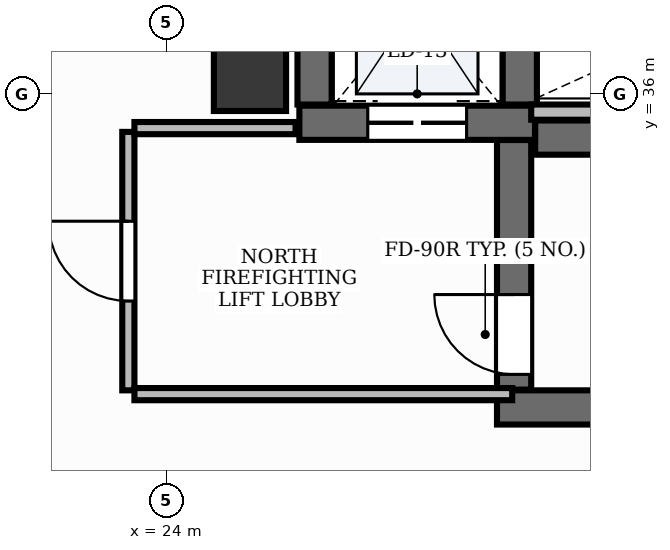
"""IFC4 building model, lengths in metres.
Left out: names, types, materials, properties, quantities, classifications, styles, units other than length and angle.
Written with IfcOpenShell. Run it as: python <this file> out.ifc"""

import sys

from ifc_helpers import new_model, si_unit, direction, frame, frame_2d, origin, origin_2d, place, context, subcontext, project, spatial, rectangle, extrude, element, fill, save


model = new_model("IFC4")
c1 = context("Model", 3, precision=1e-05, world=origin(), true_north=direction((0.0, 1.0)))
c2 = subcontext(c1, "Body", "Model", "MODEL_VIEW")
j1 = project(units=[si_unit("LENGTHUNIT", "METRE"), si_unit("PLANEANGLEUNIT", "RADIAN")], contexts=[c1])
p1 = place(None, origin())
s1 = spatial("IfcSite", under=j1, at=p1, CompositionType="ELEMENT")
p2 = place(p1, origin())
s2 = spatial("IfcBuilding", under=s1, at=p2, CompositionType="ELEMENT")
p3 = place(p2, frame((0.0, 0.0, 67.8)))
s3 = spatial("IfcBuildingStorey", under=s2, at=p3, CompositionType="ELEMENT", Elevation=67.8)
p4 = place(p3, frame((28.852, 35.425, 0.0), z_axis=(0.0, 0.0, 1.0), x_axis=(1.0, 0.0, 0.0)))
e1 = element("IfcWall", 1, at=p4, inside=s3, PredefinedType="SHEAR", context=c2, shape_type="SweptSolid", body=[
    extrude(rectangle(XDim=8.248, YDim=0.45, at=frame_2d((4.124, 0.0))), origin(), (0.0, 0.0, 1.0), 3.9),
])
p5 = place(p3, frame((28.35, 31.875, 0.0), z_axis=(0.0, 0.0, 1.0), x_axis=(1.0, 0.0, 0.0)))
e2 = element("IfcWall", 2, at=p5, inside=s3, PredefinedType="SHEAR", context=c2, shape_type="SweptSolid", body=[
    extrude(rectangle(XDim=8.75, YDim=0.45, at=frame_2d((4.375, 0.0))), origin(), (0.0, 0.0, 1.0), 3.9),
])
p6 = place(p3, frame((28.575, 32.11, 0.0), z_axis=(0.0, 0.0, 1.0), x_axis=(0.0, 1.0, 0.0)))
e3 = element("IfcWall", 3, at=p6, inside=s3, PredefinedType="SHEAR", context=c2, shape_type="SweptSolid", body=[
    extrude(rectangle(XDim=3.283, YDim=0.45, at=frame_2d((1.642, 0.0))), origin(), (0.0, 0.0, 1.0), 3.9),
])
p7 = place(p6, frame((0.2, 0.0, 0.0)))
e4 = element("IfcOpeningElement", 4, at=p7, cuts=e3, PredefinedType="OPENING", context=c2, shape_type="SweptSolid", body=[
    extrude(rectangle(XDim=1.05, YDim=2.15, at=frame_2d((0.525, 1.075))), frame((0.0, 0.24, 0.0), z_axis=(0.0, -1.0, 0.0), x_axis=(1.0, 0.0, 0.0)), (0.0, 0.0, 1.0), 0.48),
])
p8 = place(p3, frame((25.75, 35.62, 0.0), z_axis=(0.0, 0.0, 1.0), x_axis=(1.0, 0.0, 0.0)))
e5 = element("IfcWall", 5, at=p8, inside=s3, PredefinedType="SHEAR", context=c2, shape_type="SweptSolid", body=[
    extrude(rectangle(XDim=3.1, YDim=0.45, at=frame_2d((1.55, 0.0))), origin(), (0.0, 0.0, 1.0), 3.9),
])
p9 = place(p8, frame((0.9, 0.0, 0.0)))
e6 = element("IfcOpeningElement", 6, at=p9, cuts=e5, PredefinedType="OPENING", context=c2, shape_type="SweptSolid", body=[
    extrude(rectangle(XDim=1.3, YDim=2.2, at=frame_2d((0.65, 1.1))), frame((0.0, 0.24, 0.0), z_axis=(0.0, -1.0, 0.0), x_axis=(1.0, 0.0, 0.0)), (0.0, 0.0, 1.0), 0.48),
])
for number, where, z_axis, x_axis in (
    (7, (25.95, 35.86, 0.0), (0.0, 0.0, 1.0), (0.0, 1.0, 0.0)),
    (8, (28.65, 35.86, 0.0), (0.0, 0.0, 1.0), (0.0, 1.0, 0.0)),
):
    element("IfcWall", number, at=place(p3, frame(where, z_axis=z_axis, x_axis=x_axis)), inside=s3, PredefinedType="SHEAR", context=c2, shape_type="SweptSolid", body=[
        extrude(rectangle(XDim=2.7, YDim=0.45, at=frame_2d((1.35, 0.0))), origin(), (0.0, 0.0, 1.0), 3.9),
    ])
p10 = place(p3, frame((25.1, 36.25, -0.0), z_axis=(0.0, 0.0, 1.0), x_axis=(1.0, 0.0, 0.0)))
e9 = element("IfcColumn", 9, at=p10, inside=s3, PredefinedType="PILASTER", context=c2, shape_type="SweptSolid", body=[
    extrude(rectangle(XDim=0.95, YDim=0.95, at=origin_2d()), origin(), (0.0, 0.0, 1.0), 3.901),
])
p11 = place(p3, frame((28.8, 35.76, 0.0), z_axis=(0.0, 0.0, 1.0), x_axis=(1.0, 0.0, 0.0)))
e10 = element("IfcWall", 10, at=p11, inside=s3, PredefinedType="PARTITIONING", context=c2, shape_type="SweptSolid", body=[
    extrude(rectangle(XDim=4.57, YDim=0.2, at=frame_2d((2.285, 0.0))), origin(), (0.0, 0.0, 1.0), 2.91),
])
p12 = place(p3, frame((23.5, 32.1, 0.0), z_axis=(0.0, 0.0, 1.0), x_axis=(0.0, 1.0, 0.0)))
e11 = element("IfcWall", 11, at=p12, inside=s3, PredefinedType="PARTITIONING", context=c2, shape_type="SweptSolid", body=[
    extrude(rectangle(XDim=3.4, YDim=0.16, at=frame_2d((1.7, 0.0))), origin(), (0.0, 0.0, 1.0), 2.91),
])
p13 = place(p12, frame((1.175, 0.0, 0.0)))
e12 = element("IfcOpeningElement", 12, at=p13, cuts=e11, PredefinedType="OPENING", context=c2, shape_type="SweptSolid", body=[
    extrude(rectangle(XDim=1.05, YDim=2.15, at=frame_2d((0.525, 1.075))), frame((0.0, 0.095, 0.0), z_axis=(0.0, -1.0, 0.0), x_axis=(1.0, 0.0, 0.0)), (0.0, 0.0, 1.0), 0.19),
])
p14 = place(p3, frame((23.58, 32.05, 0.0), z_axis=(0.0, 0.0, 1.0), x_axis=(1.0, 0.0, 0.0)))
e13 = element("IfcWall", 13, at=p14, inside=s3, PredefinedType="PARTITIONING", context=c2, shape_type="SweptSolid", body=[
    extrude(rectangle(XDim=4.97, YDim=0.16, at=frame_2d((2.485, 0.0))), origin(), (0.0, 0.0, 1.0), 2.91),
])
p15 = place(p3, frame((23.58, 35.55, 0.0), z_axis=(0.0, 0.0, 1.0), x_axis=(1.0, 0.0, 0.0)))
e14 = element("IfcWall", 14, at=p15, inside=s3, PredefinedType="PARTITIONING", context=c2, shape_type="SweptSolid", body=[
    extrude(rectangle(XDim=2.12, YDim=0.16, at=frame_2d((1.06, 0.0))), origin(), (0.0, 0.0, 1.0), 2.91),
])
p16 = place(p7, origin())
e15 = element("IfcDoor", 15, at=p16, inside=s3, OperationType="SINGLE_SWING_RIGHT", PredefinedType="DOOR", context=c2, shape_type="SweptSolid", body=[
    extrude(rectangle(XDim=1.05, YDim=2.15, at=frame_2d((0.525, 1.075))), frame((0.0, 0.025, 0.0), z_axis=(0.0, -1.0, 0.0), x_axis=(1.0, 0.0, 0.0)), (0.0, 0.0, 1.0), 0.05),
])
fill(e4, e15)
p17 = place(p9, origin())
e16 = element("IfcDoor", 16, at=p17, inside=s3, OperationType="DOUBLE_DOOR_SLIDING", PredefinedType="DOOR", context=c2, shape_type="SweptSolid", body=[
    extrude(rectangle(XDim=1.3, YDim=2.2, at=frame_2d((0.65, 1.1))), frame((0.0, 0.025, 0.0), z_axis=(0.0, -1.0, 0.0), x_axis=(1.0, 0.0, 0.0)), (0.0, 0.0, 1.0), 0.05),
])
fill(e6, e16)
p18 = place(p13, origin())
e17 = element("IfcDoor", 17, at=p18, inside=s3, OperationType="SINGLE_SWING_RIGHT", PredefinedType="DOOR", context=c2, shape_type="SweptSolid", body=[
    extrude(rectangle(XDim=1.05, YDim=2.15, at=frame_2d((0.525, 1.075))), frame((0.0, 0.025, 0.0), z_axis=(0.0, -1.0, 0.0), x_axis=(1.0, 0.0, 0.0)), (0.0, 0.0, 1.0), 0.05),
])
fill(e12, e17)
save(model, sys.argv[1])
